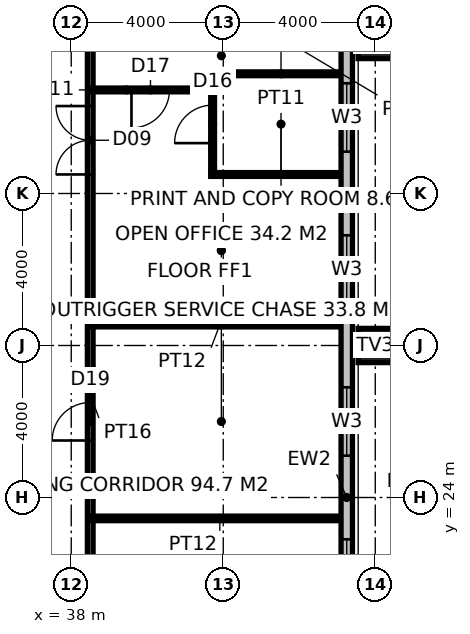
"""IFC4 building model, lengths in metres.
Left out: names, types, materials, properties, quantities, classifications, styles, units other than length and angle.
Written with IfcOpenShell. Run it as: python <this file> out.ifc"""

import sys

from ifc_helpers import new_model, si_unit, direction, frame, frame_2d, origin, origin_2d, place, context, subcontext, project, spatial, rectangle, hollow_rectangle, extrude, element, fill, save


model = new_model("IFC4")
c1 = context("Model", 3, precision=1e-05, world=origin(), true_north=direction((0.0, 1.0)))
c2 = subcontext(c1, "Body", "Model", "MODEL_VIEW")
j1 = project(units=[si_unit("LENGTHUNIT", "METRE"), si_unit("PLANEANGLEUNIT", "RADIAN")], contexts=[c1])
p1 = place(None, origin())
s1 = spatial("IfcSite", under=j1, at=p1, CompositionType="ELEMENT")
p2 = place(p1, origin())
s2 = spatial("IfcBuilding", under=s1, at=p2, CompositionType="ELEMENT")
p3 = place(p2, frame((0.0, 0.0, 270.2)))
s3 = spatial("IfcBuildingStorey", under=s2, at=p3, CompositionType="ELEMENT", Elevation=270.2)
for number, where, z_axis, x_axis in (
    (1, (46.0, 28.0, 0.0), (0.0, 0.0, 1.0), (1.0, 0.0, 0.0)),
    (2, (46.0, 36.0, 0.0), (0.0, 0.0, 1.0), (1.0, 0.0, 0.0)),
):
    element("IfcColumn", number, at=place(p3, frame(where, z_axis=z_axis, x_axis=x_axis)), inside=s3, PredefinedType="USERDEFINED", context=c2, shape_type="SweptSolid", body=[
        extrude(hollow_rectangle(XDim=0.9, YDim=0.9, WallThickness=0.08, at=origin_2d()), origin(), (0.0, 0.0, 1.0), 4.0),
    ])
p4 = place(p3, frame((38.5, 15.025, 0.0), z_axis=(0.0, 0.0, 1.0), x_axis=(0.0, 1.0, 0.0)))
e3 = element("IfcWall", 3, at=p4, inside=s3, PredefinedType="PARTITIONING", context=c2, shape_type="SweptSolid", body=[
    extrude(rectangle(XDim=23.35, YDim=0.15, at=frame_2d((11.675, 0.0))), origin(), (0.0, 0.0, 1.0), 2.85),
])
p5 = place(p4, frame((3.374, 0.0, 0.0)))
e4 = element("IfcOpeningElement", 4, at=p5, cuts=e3, PredefinedType="OPENING", context=c2, shape_type="SweptSolid", body=[
    extrude(rectangle(XDim=1.8, YDim=2.4, at=frame_2d((0.9, 1.2))), frame((0.0, 0.085, 0.0), z_axis=(0.0, -1.0, 0.0), x_axis=(1.0, 0.0, 0.0)), (0.0, 0.0, 1.0), 0.17),
])
p6 = place(p4, frame((17.476, 0.0, 0.0)))
e5 = element("IfcOpeningElement", 5, at=p6, cuts=e3, PredefinedType="OPENING", context=c2, shape_type="SweptSolid", body=[
    extrude(rectangle(XDim=1.8, YDim=2.4, at=frame_2d((0.9, 1.2))), frame((0.0, 0.085, 0.0), z_axis=(0.0, -1.0, 0.0), x_axis=(1.0, 0.0, 0.0)), (0.0, 0.0, 1.0), 0.17),
])
p7 = place(p4, frame((10.475, 0.0, 0.0)))
e6 = element("IfcOpeningElement", 6, at=p7, cuts=e3, PredefinedType="OPENING", context=c2, shape_type="SweptSolid", body=[
    extrude(rectangle(XDim=1.0, YDim=2.2, at=frame_2d((0.5, 1.1))), frame((0.0, 0.085, 0.0), z_axis=(0.0, -1.0, 0.0), x_axis=(1.0, 0.0, 0.0)), (0.0, 0.0, 1.0), 0.17),
])
for number, where, z_axis, x_axis in (
    (7, (38.5, 23.45, 0.0), (0.0, 0.0, 1.0), (1.0, 0.0, 0.0)),
    (8, (38.5, 28.55, 0.0), (0.0, 0.0, 1.0), (1.0, 0.0, 0.0)),
):
    element("IfcWall", number, at=place(p3, frame(where, z_axis=z_axis, x_axis=x_axis)), inside=s3, PredefinedType="PARTITIONING", context=c2, shape_type="SweptSolid", body=[
        extrude(rectangle(XDim=6.82, YDim=0.12, at=frame_2d((3.41, 0.0))), origin(), (0.0, 0.0, 1.0), 2.65),
    ])
p8 = place(p3, frame((41.67, 32.5, 0.0), z_axis=(0.0, 0.0, 1.0), x_axis=(1.0, 0.0, 0.0)))
e9 = element("IfcWall", 9, at=p8, inside=s3, PredefinedType="PARTITIONING", context=c2, shape_type="SweptSolid", body=[
    extrude(rectangle(XDim=3.7, YDim=0.1, at=frame_2d((1.85, 0.0))), origin(), (0.0, 0.0, 1.0), 2.65),
])
p9 = place(p3, frame((41.67, 35.15, 0.0), z_axis=(0.0, 0.0, 1.0), x_axis=(1.0, 0.0, 0.0)))
e10 = element("IfcWall", 10, at=p9, inside=s3, PredefinedType="PARTITIONING", context=c2, shape_type="SweptSolid", body=[
    extrude(rectangle(XDim=3.7, YDim=0.1, at=frame_2d((1.85, 0.0))), origin(), (0.0, 0.0, 1.0), 3.85),
])
p10 = place(p3, frame((41.72, 32.55, 0.0), z_axis=(0.0, 0.0, 1.0), x_axis=(0.0, 1.0, 0.0)))
e11 = element("IfcWall", 11, at=p10, inside=s3, PredefinedType="PARTITIONING", context=c2, shape_type="SweptSolid", body=[
    extrude(rectangle(XDim=2.55, YDim=0.1, at=frame_2d((1.275, 0.0))), origin(), (0.0, 0.0, 1.0), 3.85),
])
p11 = place(p10, frame((0.775, 0.0, 0.0)))
e12 = element("IfcOpeningElement", 12, at=p11, cuts=e11, PredefinedType="OPENING", context=c2, shape_type="SweptSolid", body=[
    extrude(rectangle(XDim=1.0, YDim=2.2, at=frame_2d((0.5, 1.1))), frame((0.0, 0.06, 0.0), z_axis=(0.0, -1.0, 0.0), x_axis=(1.0, 0.0, 0.0)), (0.0, 0.0, 1.0), 0.12),
])
p12 = place(p3, frame((41.67, 34.725, 0.0), z_axis=(0.0, 0.0, 1.0), x_axis=(-1.0, 0.0, 0.0)))
e13 = element("IfcWall", 13, at=p12, inside=s3, PredefinedType="PARTITIONING", context=c2, shape_type="SweptSolid", body=[
    extrude(rectangle(XDim=3.17, YDim=0.1, at=frame_2d((1.585, 0.0))), origin(), (0.0, 0.0, 1.0), 3.85),
])
p13 = place(p12, frame((1.085, 0.0, 0.0)))
e14 = element("IfcOpeningElement", 14, at=p13, cuts=e13, PredefinedType="OPENING", context=c2, shape_type="SweptSolid", body=[
    extrude(rectangle(XDim=1.0, YDim=2.2, at=frame_2d((0.5, 1.1))), frame((0.0, 0.06, 0.0), z_axis=(0.0, -1.0, 0.0), x_axis=(1.0, 0.0, 0.0)), (0.0, 0.0, 1.0), 0.12),
])
p14 = place(p3, frame((45.25, 7.6, 0.0), z_axis=(0.0, 0.0, 1.0), x_axis=(0.0, 1.0, 0.0)))
e15 = element("IfcWall", 15, at=p14, inside=s3, PredefinedType="ELEMENTEDWALL", context=c2, shape_type="SweptSolid", body=[
    extrude(rectangle(XDim=32.8, YDim=0.3, at=frame_2d((16.4, 0.0))), origin(), (0.0, 0.0, 1.0), 3.85),
])
p15 = place(p14, frame((5.5, 0.0, 0.8)))
e16 = element("IfcOpeningElement", 16, at=p15, cuts=e15, PredefinedType="OPENING", context=c2, shape_type="SweptSolid", body=[
    extrude(rectangle(XDim=1.8, YDim=2.4, at=frame_2d((0.9, 1.2))), frame((0.0, 0.16, 0.0), z_axis=(0.0, -1.0, 0.0), x_axis=(1.0, 0.0, 0.0)), (0.0, 0.0, 1.0), 0.32),
])
p16 = place(p14, frame((9.5, 0.0, 0.0)))
e17 = element("IfcOpeningElement", 17, at=p16, cuts=e15, PredefinedType="OPENING", context=c2, shape_type="SweptSolid", body=[
    extrude(rectangle(XDim=1.8, YDim=2.4, at=frame_2d((0.9, 1.2))), frame((0.0, 0.16, 0.0), z_axis=(0.0, -1.0, 0.0), x_axis=(1.0, 0.0, 0.0)), (0.0, 0.0, 1.0), 0.32),
])
p17 = place(p14, frame((13.5, 0.0, 0.8)))
e18 = element("IfcOpeningElement", 18, at=p17, cuts=e15, PredefinedType="OPENING", context=c2, shape_type="SweptSolid", body=[
    extrude(rectangle(XDim=1.8, YDim=2.4, at=frame_2d((0.9, 1.2))), frame((0.0, 0.16, 0.0), z_axis=(0.0, -1.0, 0.0), x_axis=(1.0, 0.0, 0.0)), (0.0, 0.0, 1.0), 0.32),
])
p18 = place(p14, frame((17.5, 0.0, 0.8)))
e19 = element("IfcOpeningElement", 19, at=p18, cuts=e15, PredefinedType="OPENING", context=c2, shape_type="SweptSolid", body=[
    extrude(rectangle(XDim=1.8, YDim=2.4, at=frame_2d((0.9, 1.2))), frame((0.0, 0.16, 0.0), z_axis=(0.0, -1.0, 0.0), x_axis=(1.0, 0.0, 0.0)), (0.0, 0.0, 1.0), 0.32),
])
p19 = place(p14, frame((21.5, 0.0, 0.8)))
e20 = element("IfcOpeningElement", 20, at=p19, cuts=e15, PredefinedType="OPENING", context=c2, shape_type="SweptSolid", body=[
    extrude(rectangle(XDim=1.8, YDim=2.4, at=frame_2d((0.9, 1.2))), frame((0.0, 0.16, 0.0), z_axis=(0.0, -1.0, 0.0), x_axis=(1.0, 0.0, 0.0)), (0.0, 0.0, 1.0), 0.32),
])
p20 = place(p14, frame((25.5, 0.0, 0.8)))
e21 = element("IfcOpeningElement", 21, at=p20, cuts=e15, PredefinedType="OPENING", context=c2, shape_type="SweptSolid", body=[
    extrude(rectangle(XDim=1.8, YDim=2.4, at=frame_2d((0.9, 1.2))), frame((0.0, 0.16, 0.0), z_axis=(0.0, -1.0, 0.0), x_axis=(1.0, 0.0, 0.0)), (0.0, 0.0, 1.0), 0.32),
])
p21 = place(p6, origin())
e22 = element("IfcDoor", 22, at=p21, inside=s3, OperationType="DOUBLE_DOOR_DOUBLE_SWING", PredefinedType="DOOR", context=c2, shape_type="SweptSolid", body=[
    extrude(rectangle(XDim=1.8, YDim=2.4, at=frame_2d((0.9, 1.2))), frame((0.0, 0.025, 0.0), z_axis=(0.0, -1.0, 0.0), x_axis=(1.0, 0.0, 0.0)), (0.0, 0.0, 1.0), 0.05),
])
fill(e5, e22)
p22 = place(p7, origin())
e23 = element("IfcDoor", 23, at=p22, inside=s3, OperationType="SINGLE_SWING_LEFT", PredefinedType="DOOR", context=c2, shape_type="SweptSolid", body=[
    extrude(rectangle(XDim=1.0, YDim=2.2, at=frame_2d((0.5, 1.1))), frame((0.0, 0.025, 0.0), z_axis=(0.0, -1.0, 0.0), x_axis=(1.0, 0.0, 0.0)), (0.0, 0.0, 1.0), 0.05),
])
fill(e6, e23)
p23 = place(p11, origin())
e24 = element("IfcDoor", 24, at=p23, inside=s3, OperationType="SINGLE_SWING_LEFT", PredefinedType="DOOR", context=c2, shape_type="SweptSolid", body=[
    extrude(rectangle(XDim=1.0, YDim=2.2, at=frame_2d((0.5, 1.1))), frame((0.0, 0.025, 0.0), z_axis=(0.0, -1.0, 0.0), x_axis=(1.0, 0.0, 0.0)), (0.0, 0.0, 1.0), 0.05),
])
fill(e12, e24)
p24 = place(p13, origin())
e25 = element("IfcDoor", 25, at=p24, inside=s3, OperationType="SINGLE_SWING_RIGHT", PredefinedType="DOOR", context=c2, shape_type="SweptSolid", body=[
    extrude(rectangle(XDim=1.0, YDim=2.2, at=frame_2d((0.5, 1.1))), frame((0.0, 0.025, 0.0), z_axis=(0.0, -1.0, 0.0), x_axis=(1.0, 0.0, 0.0)), (0.0, 0.0, 1.0), 0.05),
])
fill(e14, e25)
p25 = place(p17, origin())
e26 = element("IfcWindow", 26, at=p25, inside=s3, PartitioningType="SINGLE_PANEL", PredefinedType="WINDOW", context=c2, shape_type="SweptSolid", body=[
    extrude(rectangle(XDim=1.8, YDim=2.4, at=frame_2d((0.9, 1.2))), frame((0.0, 0.03, 0.0), z_axis=(0.0, -1.0, 0.0), x_axis=(1.0, 0.0, 0.0)), (0.0, 0.0, 1.0), 0.06),
])
fill(e18, e26)
p26 = place(p18, origin())
e27 = element("IfcWindow", 27, at=p26, inside=s3, PartitioningType="SINGLE_PANEL", PredefinedType="WINDOW", context=c2, shape_type="SweptSolid", body=[
    extrude(rectangle(XDim=1.8, YDim=2.4, at=frame_2d((0.9, 1.2))), frame((0.0, 0.03, 0.0), z_axis=(0.0, -1.0, 0.0), x_axis=(1.0, 0.0, 0.0)), (0.0, 0.0, 1.0), 0.06),
])
fill(e19, e27)
p27 = place(p19, origin())
e28 = element("IfcWindow", 28, at=p27, inside=s3, PartitioningType="SINGLE_PANEL", PredefinedType="WINDOW", context=c2, shape_type="SweptSolid", body=[
    extrude(rectangle(XDim=1.8, YDim=2.4, at=frame_2d((0.9, 1.2))), frame((0.0, 0.03, 0.0), z_axis=(0.0, -1.0, 0.0), x_axis=(1.0, 0.0, 0.0)), (0.0, 0.0, 1.0), 0.06),
])
fill(e20, e28)
p28 = place(p20, origin())
e29 = element("IfcWindow", 29, at=p28, inside=s3, PartitioningType="SINGLE_PANEL", PredefinedType="WINDOW", context=c2, shape_type="SweptSolid", body=[
    extrude(rectangle(XDim=1.8, YDim=2.4, at=frame_2d((0.9, 1.2))), frame((0.0, 0.03, 0.0), z_axis=(0.0, -1.0, 0.0), x_axis=(1.0, 0.0, 0.0)), (0.0, 0.0, 1.0), 0.06),
])
fill(e21, e29)
save(model, sys.argv[1])
